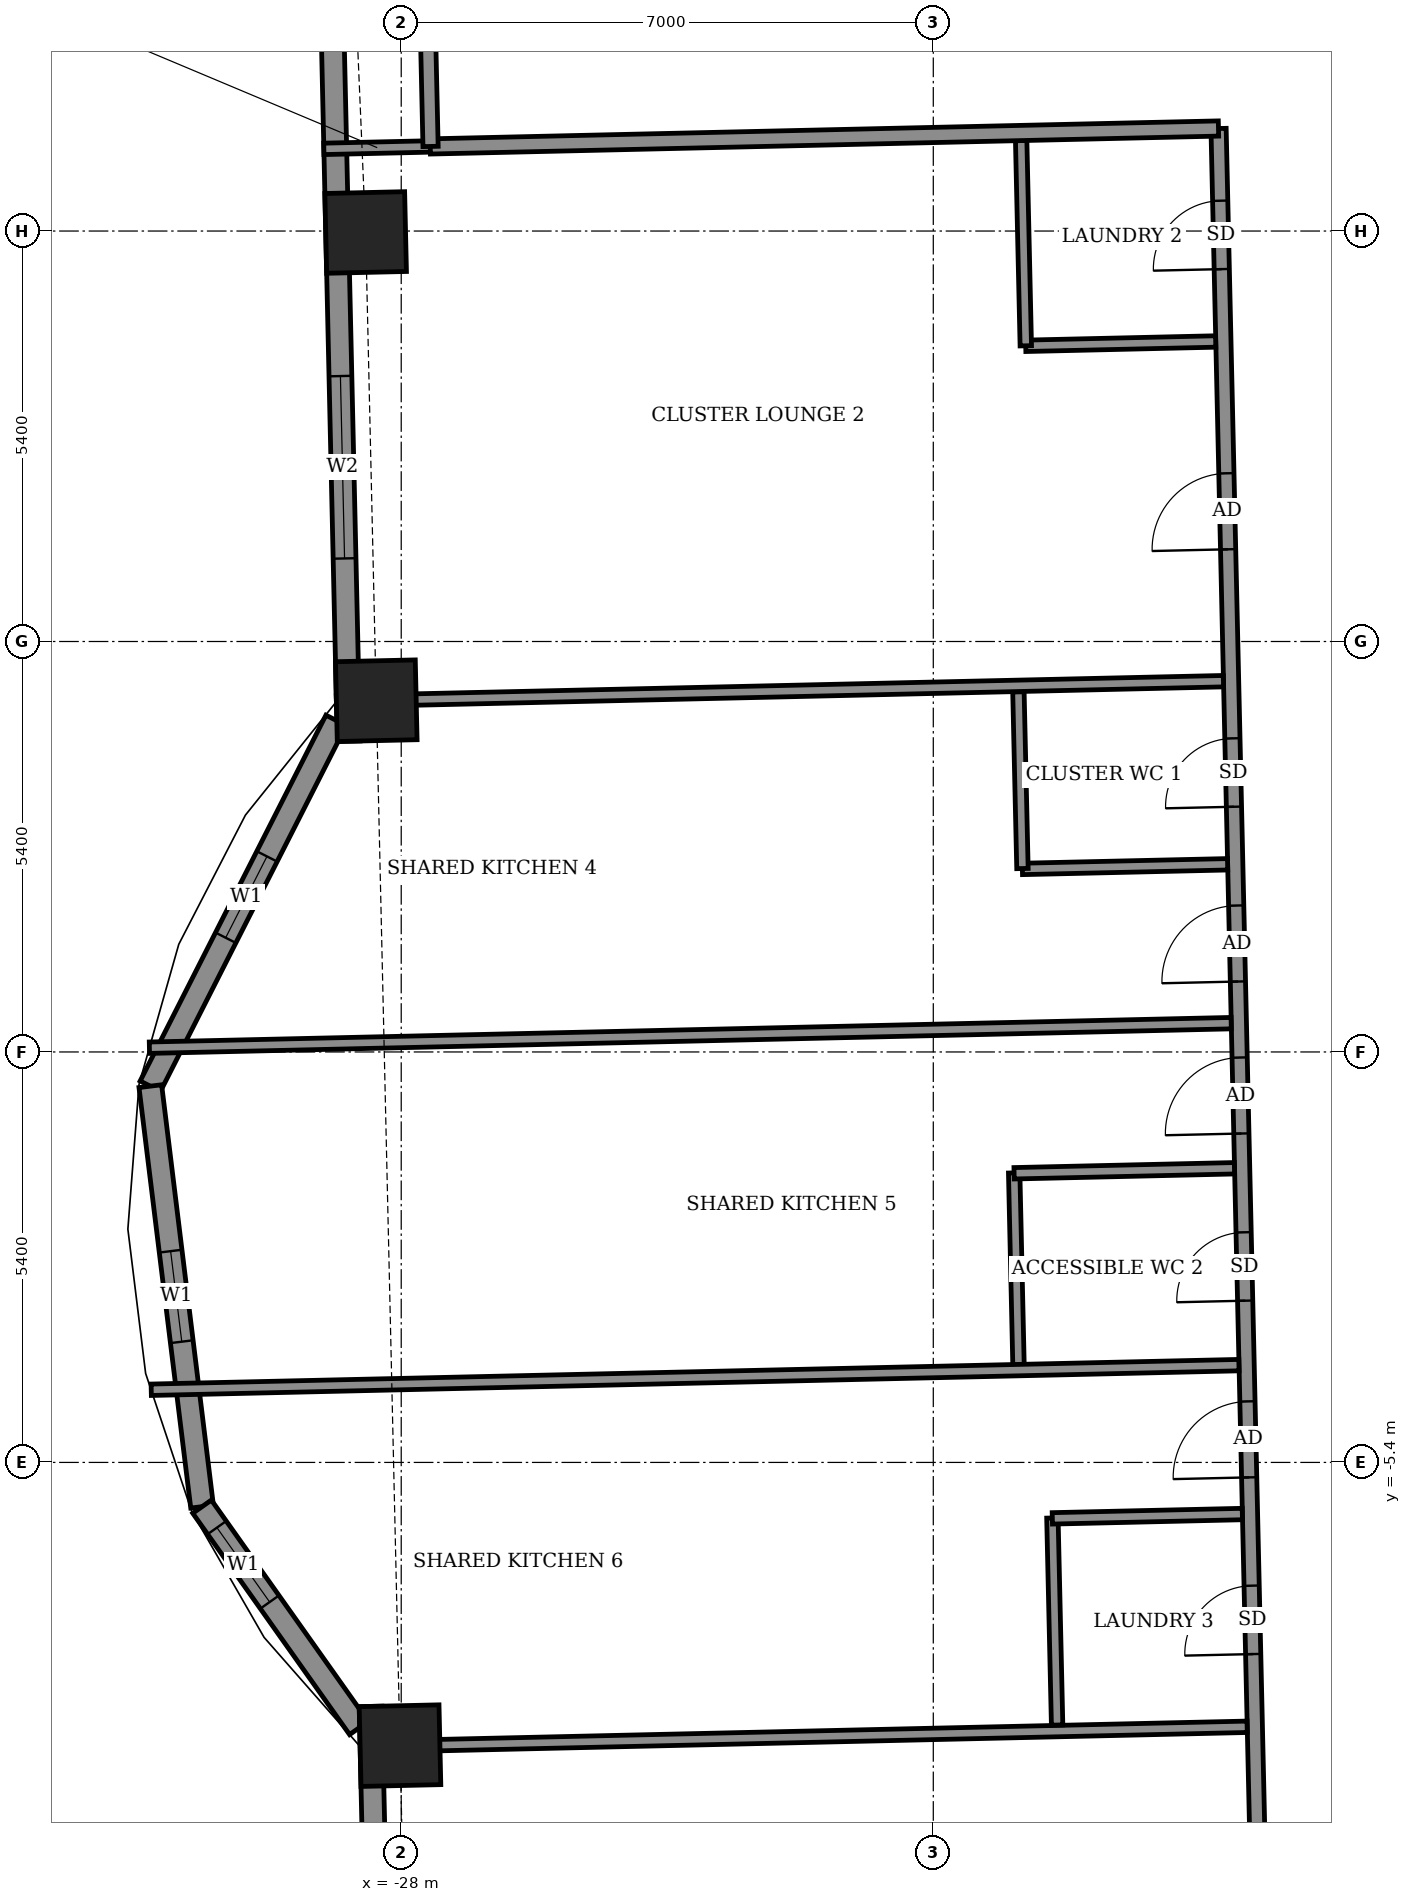
"""IFC4 building model, lengths in metres.
Left out: names, types, materials, properties, quantities, classifications, styles, units other than length and angle.
Written with IfcOpenShell. Run it as: python <this file> out.ifc"""

import sys

from ifc_helpers import new_model, si_unit, direction, frame, frame_2d, origin, origin_2d, place, context, subcontext, project, spatial, rectangle, extrude, element, fill, save


model = new_model("IFC4")
c1 = context("Model", 3, precision=1e-05, world=origin(), true_north=direction((0.0, 1.0)))
c2 = subcontext(c1, "Body", "Model", "MODEL_VIEW")
j1 = project(units=[si_unit("LENGTHUNIT", "METRE"), si_unit("PLANEANGLEUNIT", "RADIAN")], contexts=[c1])
p1 = place(None, origin())
s1 = spatial("IfcSite", under=j1, at=p1, CompositionType="ELEMENT")
p2 = place(p1, origin())
s2 = spatial("IfcBuilding", under=s1, at=p2, CompositionType="ELEMENT")
p3 = place(p2, frame((0.0, 0.0, 249.1)))
s3 = spatial("IfcBuildingStorey", under=s2, at=p3, CompositionType="ELEMENT", Elevation=249.1)
for number, where, z_axis, x_axis in (
    (1, (-28.016, -9.126, -0.55), (0.0, 0.0, 1.0), (0.023, -1.0, 0.0)),
    (2, (-28.468, 10.781, -0.55), (0.0, 0.0, 1.0), (0.023, -1.0, 0.0)),
    (3, (-28.328, 4.621, -0.55), (0.0, 0.0, 1.0), (0.023, -1.0, 0.0)),
):
    element("IfcColumn", number, at=place(p3, frame(where, z_axis=z_axis, x_axis=x_axis)), inside=s3, PredefinedType="COLUMN", context=c2, shape_type="SweptSolid", body=[
        extrude(rectangle(XDim=1.05, YDim=1.05, at=origin_2d()), origin(), (0.0, 0.0, 1.0), 3.6),
    ])
p4 = place(p3, frame((-28.979, 16.784, 0.0), z_axis=(0.0, 0.0, 1.0), x_axis=(0.022685159264, -0.999742658662, 0.0)))
e4 = element("IfcWall", 4, at=p4, inside=s3, PredefinedType="SOLIDWALL", context=c2, shape_type="SweptSolid", body=[
    extrude(rectangle(XDim=12.699, YDim=0.3, at=frame_2d((6.35, 0.0))), origin(), (0.0, 0.0, 1.0), 2.55),
])
p5 = place(p4, frame((2.035, 0.0, 0.0)))
e5 = element("IfcOpeningElement", 5, at=p5, cuts=e4, PredefinedType="OPENING", context=c2, shape_type="SweptSolid", body=[
    extrude(rectangle(XDim=1.5, YDim=2.4, at=frame_2d((0.75, 1.2))), frame((0.0, 0.16, 0.0), z_axis=(0.0, -1.0, 0.0), x_axis=(1.0, 0.0, 0.0)), (0.0, 0.0, 1.0), 0.32),
])
p6 = place(p4, frame((7.894, 0.0, 0.9)))
e6 = element("IfcOpeningElement", 6, at=p6, cuts=e4, PredefinedType="OPENING", context=c2, shape_type="SweptSolid", body=[
    extrude(rectangle(XDim=2.4, YDim=1.5, at=frame_2d((1.2, 0.75))), frame((0.0, 0.16, 0.0), z_axis=(0.0, -1.0, 0.0), x_axis=(1.0, 0.0, 0.0)), (0.0, 0.0, 1.0), 0.32),
])
p7 = place(p3, frame((-28.857, 4.363, 0.0), z_axis=(0.0, 0.0, 1.0), x_axis=(-0.45277700056, -0.891623792731, 0.0)))
e7 = element("IfcWall", 7, at=p7, inside=s3, PredefinedType="SOLIDWALL", context=c2, shape_type="SweptSolid", body=[
    extrude(rectangle(XDim=5.398, YDim=0.3, at=frame_2d((2.699, 0.0))), origin(), (0.0, 0.0, 1.0), 3.05),
])
p8 = place(p7, frame((2.008, 0.0, 0.9)))
e8 = element("IfcOpeningElement", 8, at=p8, cuts=e7, PredefinedType="OPENING", context=c2, shape_type="SweptSolid", body=[
    extrude(rectangle(XDim=1.2, YDim=1.5, at=frame_2d((0.6, 0.75))), frame((0.0, 0.16, 0.0), z_axis=(0.0, -1.0, 0.0), x_axis=(1.0, 0.0, 0.0)), (0.0, 0.0, 1.0), 0.32),
])
p9 = place(p3, frame((-31.301, -0.45, 0.0), z_axis=(0.0, 0.0, 1.0), x_axis=(0.122163831021, -0.992509948761, 0.0)))
e9 = element("IfcWall", 9, at=p9, inside=s3, PredefinedType="SOLIDWALL", context=c2, shape_type="SweptSolid", body=[
    extrude(rectangle(XDim=5.574, YDim=0.3, at=frame_2d((2.787, 0.0))), origin(), (0.0, 0.0, 1.0), 3.05),
])
p10 = place(p9, frame((2.187, 0.0, 0.9)))
e10 = element("IfcOpeningElement", 10, at=p10, cuts=e9, PredefinedType="OPENING", context=c2, shape_type="SweptSolid", body=[
    extrude(rectangle(XDim=1.2, YDim=1.5, at=frame_2d((0.6, 0.75))), frame((0.0, 0.16, 0.0), z_axis=(0.0, -1.0, 0.0), x_axis=(1.0, 0.0, 0.0)), (0.0, 0.0, 1.0), 0.32),
])
p11 = place(p3, frame((-30.62, -5.982, 0.0), z_axis=(0.0, 0.0, 1.0), x_axis=(0.578108441206, -0.815959943996, 0.0)))
e11 = element("IfcWall", 11, at=p11, inside=s3, PredefinedType="SOLIDWALL", context=c2, shape_type="SweptSolid", body=[
    extrude(rectangle(XDim=3.569, YDim=0.3, at=frame_2d((1.784, 0.0))), origin(), (0.0, 0.0, 1.0), 3.05),
])
p12 = place(p11, frame((0.338, 0.0, 0.9)))
e12 = element("IfcOpeningElement", 12, at=p12, cuts=e11, PredefinedType="OPENING", context=c2, shape_type="SweptSolid", body=[
    extrude(rectangle(XDim=1.2, YDim=1.5, at=frame_2d((0.6, 0.75))), frame((0.0, 0.16, 0.0), z_axis=(0.0, -1.0, 0.0), x_axis=(1.0, 0.0, 0.0)), (0.0, 0.0, 1.0), 0.32),
])
p13 = place(p3, frame((-28.403, -8.61, 0.0), z_axis=(0.0, 0.0, 1.0), x_axis=(0.022680342038, -0.999742767958, 0.0)))
e13 = element("IfcWall", 13, at=p13, inside=s3, PredefinedType="SOLIDWALL", context=c2, shape_type="SweptSolid", body=[
    extrude(rectangle(XDim=13.1, YDim=0.3, at=frame_2d((6.55, 0.0))), origin(), (0.0, 0.0, 1.0), 2.55),
])
p14 = place(p13, frame((1.937, 0.0, 0.0)))
e14 = element("IfcOpeningElement", 14, at=p14, cuts=e13, PredefinedType="OPENING", context=c2, shape_type="SweptSolid", body=[
    extrude(rectangle(XDim=1.5, YDim=2.4, at=frame_2d((0.75, 1.2))), frame((0.0, 0.16, 0.0), z_axis=(0.0, -1.0, 0.0), x_axis=(1.0, 0.0, 0.0)), (0.0, 0.0, 1.0), 0.32),
])
p15 = place(p13, frame((8.611, 0.0, 0.9)))
e15 = element("IfcOpeningElement", 15, at=p15, cuts=e13, PredefinedType="OPENING", context=c2, shape_type="SweptSolid", body=[
    extrude(rectangle(XDim=2.4, YDim=1.5, at=frame_2d((1.2, 0.75))), frame((0.0, 0.16, 0.0), z_axis=(0.0, -1.0, 0.0), x_axis=(1.0, 0.0, 0.0)), (0.0, 0.0, 1.0), 0.32),
])
p16 = place(p3, frame((-31.473, 4.799, 0.0), z_axis=(0.0, 0.0, 1.0), x_axis=(-0.022744303924, 0.999741314861, 0.0)))
e16 = element("IfcWall", 16, at=p16, inside=s3, PredefinedType="USERDEFINED", context=c2, shape_type="SweptSolid", body=[
    extrude(rectangle(XDim=3.875, YDim=0.55, at=frame_2d((1.938, 0.0))), origin(), (0.0, 0.0, 1.0), 0.8),
])
p17 = place(p3, frame((-16.678, -12.919, 0.0), z_axis=(0.0, 0.0, 1.0), x_axis=(-0.022696191528, 0.999742408268, 0.0)))
e17 = element("IfcWall", 17, at=p17, inside=s3, PredefinedType="PARTITIONING", context=c2, shape_type="SweptSolid", body=[
    extrude(rectangle(XDim=25.074, YDim=0.2, at=frame_2d((12.537, 0.0))), origin(), (0.0, 0.0, 1.0), 3.05),
])
p18 = place(p17, frame((19.537, 0.0, 0.0)))
e18 = element("IfcOpeningElement", 18, at=p18, cuts=e17, PredefinedType="OPENING", context=c2, shape_type="SweptSolid", body=[
    extrude(rectangle(XDim=1.0, YDim=2.1, at=frame_2d((0.5, 1.05))), frame((0.0, 0.11, 0.0), z_axis=(0.0, -1.0, 0.0), x_axis=(1.0, 0.0, 0.0)), (0.0, 0.0, 1.0), 0.22),
])
p19 = place(p17, frame((23.224, 0.0, 0.0)))
e19 = element("IfcOpeningElement", 19, at=p19, cuts=e17, PredefinedType="OPENING", context=c2, shape_type="SweptSolid", body=[
    extrude(rectangle(XDim=0.9, YDim=2.1, at=frame_2d((0.45, 1.05))), frame((0.0, 0.11, 0.0), z_axis=(0.0, -1.0, 0.0), x_axis=(1.0, 0.0, 0.0)), (0.0, 0.0, 1.0), 0.22),
])
p20 = place(p17, frame((13.849, 0.0, 0.0)))
e20 = element("IfcOpeningElement", 20, at=p20, cuts=e17, PredefinedType="OPENING", context=c2, shape_type="SweptSolid", body=[
    extrude(rectangle(XDim=1.0, YDim=2.1, at=frame_2d((0.5, 1.05))), frame((0.0, 0.11, 0.0), z_axis=(0.0, -1.0, 0.0), x_axis=(1.0, 0.0, 0.0)), (0.0, 0.0, 1.0), 0.22),
])
p21 = place(p17, frame((16.149, 0.0, 0.0)))
e21 = element("IfcOpeningElement", 21, at=p21, cuts=e17, PredefinedType="OPENING", context=c2, shape_type="SweptSolid", body=[
    extrude(rectangle(XDim=0.9, YDim=2.1, at=frame_2d((0.45, 1.05))), frame((0.0, 0.11, 0.0), z_axis=(0.0, -1.0, 0.0), x_axis=(1.0, 0.0, 0.0)), (0.0, 0.0, 1.0), 0.22),
])
p22 = place(p17, frame((11.849, 0.0, 0.0)))
e22 = element("IfcOpeningElement", 22, at=p22, cuts=e17, PredefinedType="OPENING", context=c2, shape_type="SweptSolid", body=[
    extrude(rectangle(XDim=1.0, YDim=2.1, at=frame_2d((0.5, 1.05))), frame((0.0, 0.11, 0.0), z_axis=(0.0, -1.0, 0.0), x_axis=(1.0, 0.0, 0.0)), (0.0, 0.0, 1.0), 0.22),
])
p23 = place(p17, frame((9.649, 0.0, 0.0)))
e23 = element("IfcOpeningElement", 23, at=p23, cuts=e17, PredefinedType="OPENING", context=c2, shape_type="SweptSolid", body=[
    extrude(rectangle(XDim=0.9, YDim=2.1, at=frame_2d((0.45, 1.05))), frame((0.0, 0.11, 0.0), z_axis=(0.0, -1.0, 0.0), x_axis=(1.0, 0.0, 0.0)), (0.0, 0.0, 1.0), 0.22),
])
p24 = place(p17, frame((7.324, 0.0, 0.0)))
e24 = element("IfcOpeningElement", 24, at=p24, cuts=e17, PredefinedType="OPENING", context=c2, shape_type="SweptSolid", body=[
    extrude(rectangle(XDim=1.0, YDim=2.1, at=frame_2d((0.5, 1.05))), frame((0.0, 0.11, 0.0), z_axis=(0.0, -1.0, 0.0), x_axis=(1.0, 0.0, 0.0)), (0.0, 0.0, 1.0), 0.22),
])
p25 = place(p17, frame((4.999, 0.0, 0.0)))
e25 = element("IfcOpeningElement", 25, at=p25, cuts=e17, PredefinedType="OPENING", context=c2, shape_type="SweptSolid", body=[
    extrude(rectangle(XDim=0.9, YDim=2.1, at=frame_2d((0.45, 1.05))), frame((0.0, 0.11, 0.0), z_axis=(0.0, -1.0, 0.0), x_axis=(1.0, 0.0, 0.0)), (0.0, 0.0, 1.0), 0.22),
])
p26 = place(p3, frame((-28.241, -9.136, 0.0), z_axis=(0.0, 0.0, 1.0), x_axis=(0.999742533279, 0.022690684282, 0.0)))
e26 = element("IfcWall", 26, at=p26, inside=s3, PredefinedType="PARTITIONING", context=c2, shape_type="SweptSolid", body=[
    extrude(rectangle(XDim=11.373, YDim=0.15, at=frame_2d((5.687, 0.0))), origin(), (0.0, 0.0, 1.0), 3.05),
])
p27 = place(p3, frame((-19.371, -8.855, 0.0), z_axis=(0.0, 0.0, 1.0), x_axis=(-0.022760079124, 0.999740955847, 0.0)))
e27 = element("IfcWall", 27, at=p27, inside=s3, PredefinedType="PARTITIONING", context=c2, shape_type="SweptSolid", body=[
    extrude(rectangle(XDim=2.725, YDim=0.15, at=frame_2d((1.362, 0.0))), origin(), (0.0, 0.0, 1.0), 3.05),
])
p28 = place(p3, frame((-19.434, -6.136, 0.0), z_axis=(0.0, 0.0, 1.0), x_axis=(0.999741230352, 0.02274801823, 0.0)))
e28 = element("IfcWall", 28, at=p28, inside=s3, PredefinedType="PARTITIONING", context=c2, shape_type="SweptSolid", body=[
    extrude(rectangle(XDim=2.501, YDim=0.15, at=frame_2d((1.25, 0.0))), origin(), (0.0, 0.0, 1.0), 3.05),
])
p29 = place(p3, frame((-19.879, -4.115, 0.0), z_axis=(0.0, 0.0, 1.0), x_axis=(-0.022629142889, 0.99974392816, 0.0)))
e29 = element("IfcWall", 29, at=p29, inside=s3, PredefinedType="PARTITIONING", context=c2, shape_type="SweptSolid", body=[
    extrude(rectangle(XDim=2.525, YDim=0.15, at=frame_2d((1.262, 0.0))), origin(), (0.0, 0.0, 1.0), 3.05),
])
p30 = place(p3, frame((-31.289, -4.444, 0.0), z_axis=(0.0, 0.0, 1.0), x_axis=(0.99974382177, 0.022633842623, 0.0)))
e30 = element("IfcWall", 30, at=p30, inside=s3, PredefinedType="PARTITIONING", context=c2, shape_type="SweptSolid", body=[
    extrude(rectangle(XDim=14.314, YDim=0.15, at=frame_2d((7.157, 0.0))), origin(), (0.0, 0.0, 1.0), 2.05),
])
p31 = place(p3, frame((-19.937, -1.596, 0.0), z_axis=(0.0, 0.0, 1.0), x_axis=(0.999741574676, 0.022732880677, 0.0)))
e31 = element("IfcWall", 31, at=p31, inside=s3, PredefinedType="PARTITIONING", context=c2, shape_type="SweptSolid", body=[
    extrude(rectangle(XDim=2.9, YDim=0.15, at=frame_2d((1.45, 0.0))), origin(), (0.0, 0.0, 1.0), 3.05),
])
p32 = place(p3, frame((-31.313, 0.056, 0.0), z_axis=(0.0, 0.0, 1.0), x_axis=(0.999742561055, 0.022689460464, 0.0)))
e32 = element("IfcWall", 32, at=p32, inside=s3, PredefinedType="PARTITIONING", context=c2, shape_type="SweptSolid", body=[
    extrude(rectangle(XDim=14.236, YDim=0.15, at=frame_2d((7.118, 0.0))), origin(), (0.0, 0.0, 1.0), 2.05),
])
p33 = place(p3, frame((-19.828, 2.408, 0.0), z_axis=(0.0, 0.0, 1.0), x_axis=(0.99974458177, 0.022600248254, 0.0)))
e33 = element("IfcWall", 33, at=p33, inside=s3, PredefinedType="PARTITIONING", context=c2, shape_type="SweptSolid", body=[
    extrude(rectangle(XDim=2.701, YDim=0.15, at=frame_2d((1.35, 0.0))), origin(), (0.0, 0.0, 1.0), 3.05),
])
p34 = place(p3, frame((-19.827, 2.413, 0.0), z_axis=(0.0, 0.0, 1.0), x_axis=(-0.02279059109, 0.999740260747, 0.0)))
e34 = element("IfcWall", 34, at=p34, inside=s3, PredefinedType="PARTITIONING", context=c2, shape_type="SweptSolid", body=[
    extrude(rectangle(XDim=2.324, YDim=0.15, at=frame_2d((1.162, 0.0))), origin(), (0.0, 0.0, 1.0), 3.05),
])
p35 = place(p3, frame((-28.853, 4.613, 0.0), z_axis=(0.0, 0.0, 1.0), x_axis=(0.999742483, 0.022692899457, 0.0)))
e35 = element("IfcWall", 35, at=p35, inside=s3, PredefinedType="PARTITIONING", context=c2, shape_type="SweptSolid", body=[
    extrude(rectangle(XDim=11.673, YDim=0.15, at=frame_2d((5.836, 0.0))), origin(), (0.0, 0.0, 1.0), 3.05),
])
p36 = place(p3, frame((-19.784, 9.29, 0.0), z_axis=(0.0, 0.0, 1.0), x_axis=(0.999741028149, 0.022756903044, 0.0)))
e36 = element("IfcWall", 36, at=p36, inside=s3, PredefinedType="PARTITIONING", context=c2, shape_type="SweptSolid", body=[
    extrude(rectangle(XDim=2.5, YDim=0.15, at=frame_2d((1.25, 0.0))), origin(), (0.0, 0.0, 1.0), 3.05),
])
p37 = place(p3, frame((-19.783, 9.29, 0.0), z_axis=(0.0, 0.0, 1.0), x_axis=(-0.022600248254, 0.99974458177, 0.0)))
e37 = element("IfcWall", 37, at=p37, inside=s3, PredefinedType="PARTITIONING", context=c2, shape_type="SweptSolid", body=[
    extrude(rectangle(XDim=2.701, YDim=0.15, at=frame_2d((1.35, 0.0))), origin(), (0.0, 0.0, 1.0), 3.05),
])
p38 = place(p3, frame((-29.018, 11.881, 0.0), z_axis=(0.0, 0.0, 1.0), x_axis=(0.999740667531, 0.022772739949, 0.0)))
e38 = element("IfcWall", 38, at=p38, inside=s3, PredefinedType="PARTITIONING", context=c2, shape_type="SweptSolid", body=[
    extrude(rectangle(XDim=1.404, YDim=0.15, at=frame_2d((0.702, 0.0))), origin(), (0.0, 0.0, 1.0), 2.55),
])
p39 = place(p3, frame((-27.618, 11.913, 0.0), z_axis=(0.0, 0.0, 1.0), x_axis=(0.999741483035, 0.022736910479, 0.0)))
e39 = element("IfcWall", 39, at=p39, inside=s3, PredefinedType="PARTITIONING", context=c2, shape_type="SweptSolid", body=[
    extrude(rectangle(XDim=10.373, YDim=0.2, at=frame_2d((5.186, 0.0))), origin(), (0.0, 0.0, 1.0), 3.05),
])
p40 = place(p3, frame((-27.614, 11.913, 0.0), z_axis=(0.0, 0.0, 1.0), x_axis=(-0.022617910375, 0.999744182344, 0.0)))
e40 = element("IfcWall", 40, at=p40, inside=s3, PredefinedType="PARTITIONING", context=c2, shape_type="SweptSolid", body=[
    extrude(rectangle(XDim=1.5, YDim=0.2, at=frame_2d((0.75, 0.0))), origin(), (0.0, 0.0, 1.0), 3.05),
])
p41 = place(p6, origin())
e41 = element("IfcWindow", 41, at=p41, inside=s3, PartitioningType="DOUBLE_PANEL_VERTICAL", PredefinedType="WINDOW", context=c2, shape_type="SweptSolid", body=[
    extrude(rectangle(XDim=2.4, YDim=1.5, at=frame_2d((1.2, 0.75))), frame((0.0, 0.03, 0.0), z_axis=(0.0, -1.0, 0.0), x_axis=(1.0, 0.0, 0.0)), (0.0, 0.0, 1.0), 0.06),
])
fill(e6, e41)
p42 = place(p8, origin())
e42 = element("IfcWindow", 42, at=p42, inside=s3, PartitioningType="SINGLE_PANEL", PredefinedType="WINDOW", context=c2, shape_type="SweptSolid", body=[
    extrude(rectangle(XDim=1.2, YDim=1.5, at=frame_2d((0.6, 0.75))), frame((0.0, 0.03, 0.0), z_axis=(0.0, -1.0, 0.0), x_axis=(1.0, 0.0, 0.0)), (0.0, 0.0, 1.0), 0.06),
])
fill(e8, e42)
p43 = place(p10, origin())
e43 = element("IfcWindow", 43, at=p43, inside=s3, PartitioningType="SINGLE_PANEL", PredefinedType="WINDOW", context=c2, shape_type="SweptSolid", body=[
    extrude(rectangle(XDim=1.2, YDim=1.5, at=frame_2d((0.6, 0.75))), frame((0.0, 0.03, 0.0), z_axis=(0.0, -1.0, 0.0), x_axis=(1.0, 0.0, 0.0)), (0.0, 0.0, 1.0), 0.06),
])
fill(e10, e43)
p44 = place(p12, origin())
e44 = element("IfcWindow", 44, at=p44, inside=s3, PartitioningType="SINGLE_PANEL", PredefinedType="WINDOW", context=c2, shape_type="SweptSolid", body=[
    extrude(rectangle(XDim=1.2, YDim=1.5, at=frame_2d((0.6, 0.75))), frame((0.0, 0.03, 0.0), z_axis=(0.0, -1.0, 0.0), x_axis=(1.0, 0.0, 0.0)), (0.0, 0.0, 1.0), 0.06),
])
fill(e12, e44)
p45 = place(p18, origin())
e45 = element("IfcDoor", 45, at=p45, inside=s3, OperationType="SINGLE_SWING_LEFT", PredefinedType="DOOR", context=c2, shape_type="SweptSolid", body=[
    extrude(rectangle(XDim=1.0, YDim=2.1, at=frame_2d((0.5, 1.05))), frame((0.0, 0.025, 0.0), z_axis=(0.0, -1.0, 0.0), x_axis=(1.0, 0.0, 0.0)), (0.0, 0.0, 1.0), 0.05),
])
fill(e18, e45)
p46 = place(p19, origin())
e46 = element("IfcDoor", 46, at=p46, inside=s3, OperationType="SINGLE_SWING_LEFT", PredefinedType="DOOR", context=c2, shape_type="SweptSolid", body=[
    extrude(rectangle(XDim=0.9, YDim=2.1, at=frame_2d((0.45, 1.05))), frame((0.0, 0.025, 0.0), z_axis=(0.0, -1.0, 0.0), x_axis=(1.0, 0.0, 0.0)), (0.0, 0.0, 1.0), 0.05),
])
fill(e19, e46)
p47 = place(p20, origin())
e47 = element("IfcDoor", 47, at=p47, inside=s3, OperationType="SINGLE_SWING_RIGHT", PredefinedType="DOOR", context=c2, shape_type="SweptSolid", body=[
    extrude(rectangle(XDim=1.0, YDim=2.1, at=frame_2d((0.5, 1.05))), frame((0.0, 0.025, 0.0), z_axis=(0.0, -1.0, 0.0), x_axis=(1.0, 0.0, 0.0)), (0.0, 0.0, 1.0), 0.05),
])
fill(e20, e47)
p48 = place(p21, origin())
e48 = element("IfcDoor", 48, at=p48, inside=s3, OperationType="SINGLE_SWING_RIGHT", PredefinedType="DOOR", context=c2, shape_type="SweptSolid", body=[
    extrude(rectangle(XDim=0.9, YDim=2.1, at=frame_2d((0.45, 1.05))), frame((0.0, 0.025, 0.0), z_axis=(0.0, -1.0, 0.0), x_axis=(1.0, 0.0, 0.0)), (0.0, 0.0, 1.0), 0.05),
])
fill(e21, e48)
p49 = place(p22, origin())
e49 = element("IfcDoor", 49, at=p49, inside=s3, OperationType="SINGLE_SWING_LEFT", PredefinedType="DOOR", context=c2, shape_type="SweptSolid", body=[
    extrude(rectangle(XDim=1.0, YDim=2.1, at=frame_2d((0.5, 1.05))), frame((0.0, 0.025, 0.0), z_axis=(0.0, -1.0, 0.0), x_axis=(1.0, 0.0, 0.0)), (0.0, 0.0, 1.0), 0.05),
])
fill(e22, e49)
p50 = place(p23, origin())
e50 = element("IfcDoor", 50, at=p50, inside=s3, OperationType="SINGLE_SWING_LEFT", PredefinedType="DOOR", context=c2, shape_type="SweptSolid", body=[
    extrude(rectangle(XDim=0.9, YDim=2.1, at=frame_2d((0.45, 1.05))), frame((0.0, 0.025, 0.0), z_axis=(0.0, -1.0, 0.0), x_axis=(1.0, 0.0, 0.0)), (0.0, 0.0, 1.0), 0.05),
])
fill(e23, e50)
p51 = place(p24, origin())
e51 = element("IfcDoor", 51, at=p51, inside=s3, OperationType="SINGLE_SWING_RIGHT", PredefinedType="DOOR", context=c2, shape_type="SweptSolid", body=[
    extrude(rectangle(XDim=1.0, YDim=2.1, at=frame_2d((0.5, 1.05))), frame((0.0, 0.025, 0.0), z_axis=(0.0, -1.0, 0.0), x_axis=(1.0, 0.0, 0.0)), (0.0, 0.0, 1.0), 0.05),
])
fill(e24, e51)
p52 = place(p25, origin())
e52 = element("IfcDoor", 52, at=p52, inside=s3, OperationType="SINGLE_SWING_RIGHT", PredefinedType="DOOR", context=c2, shape_type="SweptSolid", body=[
    extrude(rectangle(XDim=0.9, YDim=2.1, at=frame_2d((0.45, 1.05))), frame((0.0, 0.025, 0.0), z_axis=(0.0, -1.0, 0.0), x_axis=(1.0, 0.0, 0.0)), (0.0, 0.0, 1.0), 0.05),
])
fill(e25, e52)
save(model, sys.argv[1])
